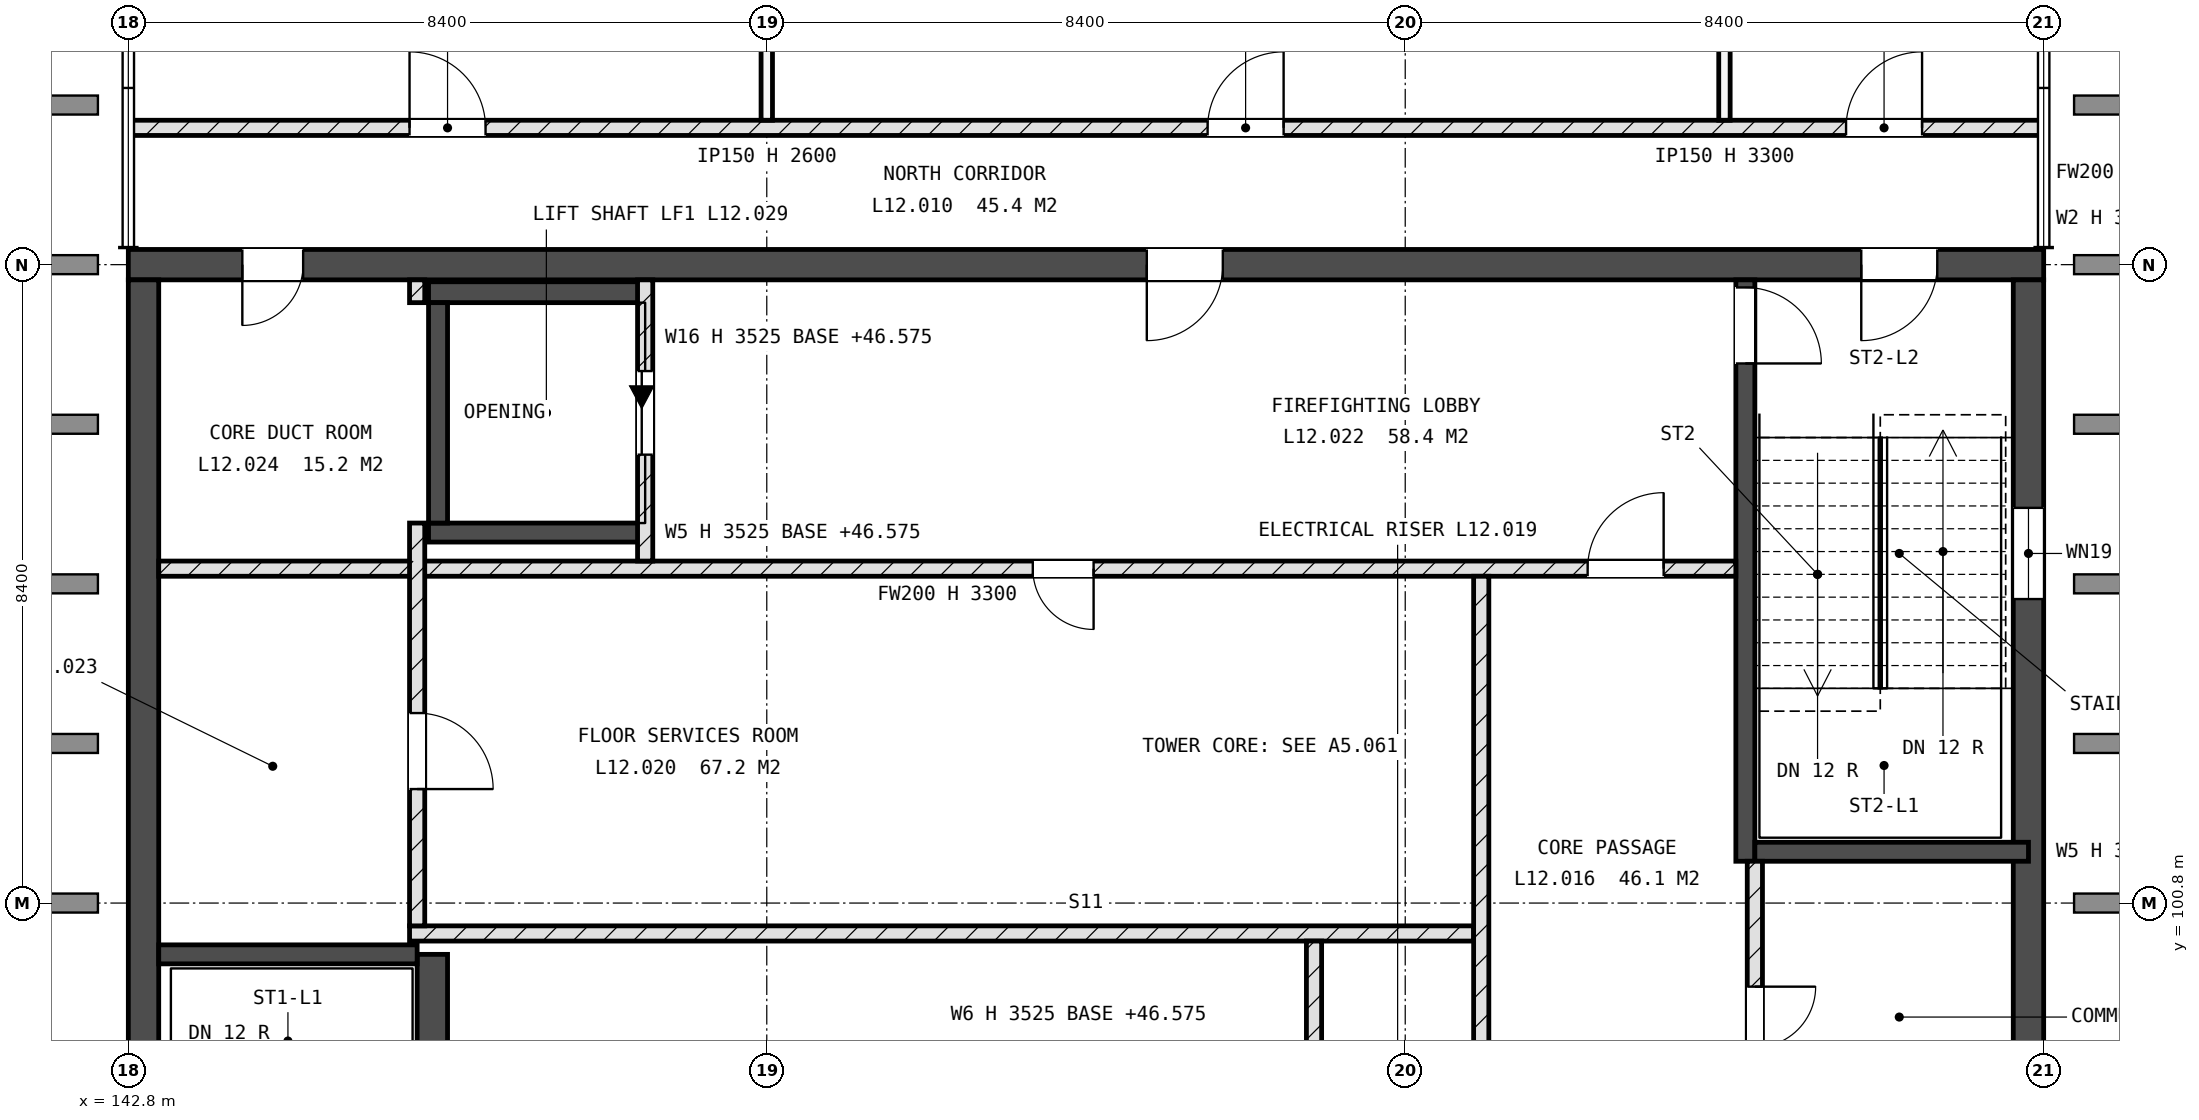
"""IFC4 building model, lengths in metres.
Left out: names, types, materials, properties, quantities, classifications, styles, units other than length and angle.
Written with IfcOpenShell. Run it as: python <this file> out.ifc"""

import sys

from ifc_helpers import new_model, si_unit, direction, frame, frame_2d, origin, place, context, subcontext, project, spatial, rectangle, extrude, element, fill, save


model = new_model("IFC4")
c1 = context("Model", 3, precision=1e-05, world=origin(), true_north=direction((0.0, 1.0)))
c2 = subcontext(c1, "Body", "Model", "MODEL_VIEW")
j1 = project(units=[si_unit("LENGTHUNIT", "METRE"), si_unit("PLANEANGLEUNIT", "RADIAN")], contexts=[c1])
p1 = place(None, origin())
s1 = spatial("IfcSite", under=j1, at=p1, CompositionType="ELEMENT")
p2 = place(p1, origin())
s2 = spatial("IfcBuilding", under=s1, at=p2, CompositionType="ELEMENT")
p3 = place(p2, frame((0.0, 0.0, 46.8)))
s3 = spatial("IfcBuildingStorey", under=s2, at=p3, CompositionType="ELEMENT", Elevation=46.8)
p4 = place(p3, frame((142.8, 109.2, -0.225), z_axis=(0.0, 0.0, 1.0), x_axis=(1.0, 0.0, 0.0)))
e1 = element("IfcWall", 1, at=p4, inside=s3, PredefinedType="SHEAR", context=c2, shape_type="SweptSolid", body=[
    extrude(rectangle(XDim=25.2, YDim=0.4, at=frame_2d((12.6, 0.0))), origin(), (0.0, 0.0, 1.0), 3.525),
])
p5 = place(p4, frame((22.8, 0.0, 0.225)))
e2 = element("IfcOpeningElement", 2, at=p5, cuts=e1, PredefinedType="OPENING", context=c2, shape_type="SweptSolid", body=[
    extrude(rectangle(XDim=1.0, YDim=2.1, at=frame_2d((0.5, 1.05))), frame((0.0, 0.21, 0.0), z_axis=(0.0, -1.0, 0.0), x_axis=(1.0, 0.0, 0.0)), (0.0, 0.0, 1.0), 0.42),
])
p6 = place(p4, frame((1.5, 0.0, 0.225)))
e3 = element("IfcOpeningElement", 3, at=p6, cuts=e1, PredefinedType="OPENING", context=c2, shape_type="SweptSolid", body=[
    extrude(rectangle(XDim=0.8, YDim=2.1, at=frame_2d((0.4, 1.05))), frame((0.0, 0.21, 0.0), z_axis=(0.0, -1.0, 0.0), x_axis=(1.0, 0.0, 0.0)), (0.0, 0.0, 1.0), 0.42),
])
p7 = place(p4, frame((13.4, 0.0, 0.225)))
e4 = element("IfcOpeningElement", 4, at=p7, cuts=e1, PredefinedType="OPENING", context=c2, shape_type="SweptSolid", body=[
    extrude(rectangle(XDim=1.0, YDim=2.1, at=frame_2d((0.5, 1.05))), frame((0.0, 0.21, 0.0), z_axis=(0.0, -1.0, 0.0), x_axis=(1.0, 0.0, 0.0)), (0.0, 0.0, 1.0), 0.42),
])
p8 = place(p3, frame((143.0, 92.6, -0.225), z_axis=(0.0, 0.0, 1.0), x_axis=(0.0, 1.0, 0.0)))
e5 = element("IfcWall", 5, at=p8, inside=s3, PredefinedType="SHEAR", context=c2, shape_type="SweptSolid", body=[
    extrude(rectangle(XDim=16.4, YDim=0.4, at=frame_2d((8.2, 0.0))), origin(), (0.0, 0.0, 1.0), 3.525),
])
p9 = place(p8, frame((3.0, 0.0, 1.825)))
e6 = element("IfcOpeningElement", 6, at=p9, cuts=e5, PredefinedType="OPENING", context=c2, shape_type="SweptSolid", body=[
    extrude(rectangle(XDim=1.2, YDim=0.9, at=frame_2d((0.6, 0.45))), frame((0.0, 0.21, 0.0), z_axis=(0.0, -1.0, 0.0), x_axis=(1.0, 0.0, 0.0)), (0.0, 0.0, 1.0), 0.42),
])
p10 = place(p3, frame((167.8, 92.6, -0.225), z_axis=(0.0, 0.0, 1.0), x_axis=(0.0, 1.0, 0.0)))
e7 = element("IfcWall", 7, at=p10, inside=s3, PredefinedType="SHEAR", context=c2, shape_type="SweptSolid", body=[
    extrude(rectangle(XDim=16.4, YDim=0.4, at=frame_2d((8.2, 0.0))), origin(), (0.0, 0.0, 1.0), 3.525),
])
p11 = place(p10, frame((12.2, 0.0, 1.825)))
e8 = element("IfcOpeningElement", 8, at=p11, cuts=e7, PredefinedType="OPENING", context=c2, shape_type="SweptSolid", body=[
    extrude(rectangle(XDim=1.2, YDim=0.9, at=frame_2d((0.6, 0.45))), frame((0.0, 0.21, 0.0), z_axis=(0.0, -1.0, 0.0), x_axis=(1.0, 0.0, 0.0)), (0.0, 0.0, 1.0), 0.42),
])
p12 = place(p3, frame((146.8, 92.6, -0.225), z_axis=(0.0, 0.0, 1.0), x_axis=(0.0, 1.0, 0.0)))
e9 = element("IfcWall", 9, at=p12, inside=s3, PredefinedType="SHEAR", context=c2, shape_type="SweptSolid", body=[
    extrude(rectangle(XDim=7.525, YDim=0.4, at=frame_2d((3.762, 0.0))), origin(), (0.0, 0.0, 1.0), 3.525),
])
p13 = place(p12, frame((0.1, 0.0, 0.225)))
e10 = element("IfcOpeningElement", 10, at=p13, cuts=e9, PredefinedType="OPENING", context=c2, shape_type="SweptSolid", body=[
    extrude(rectangle(XDim=1.0, YDim=2.1, at=frame_2d((0.5, 1.05))), frame((0.0, 0.21, 0.0), z_axis=(0.0, -1.0, 0.0), x_axis=(1.0, 0.0, 0.0)), (0.0, 0.0, 1.0), 0.42),
])
p14 = place(p3, frame((143.2, 100.125, -0.225), z_axis=(0.0, 0.0, 1.0), x_axis=(1.0, 0.0, 0.0)))
e11 = element("IfcWall", 11, at=p14, inside=s3, PredefinedType="SHEAR", context=c2, shape_type="SweptSolid", body=[
    extrude(rectangle(XDim=3.4, YDim=0.25, at=frame_2d((1.7, 0.0))), origin(), (0.0, 0.0, 1.0), 3.525),
])
p15 = place(p3, frame((164.075, 101.35, -0.225), z_axis=(0.0, 0.0, 1.0), x_axis=(0.0, 1.0, 0.0)))
e12 = element("IfcWall", 12, at=p15, inside=s3, PredefinedType="SHEAR", context=c2, shape_type="SweptSolid", body=[
    extrude(rectangle(XDim=7.65, YDim=0.25, at=frame_2d((3.825, 0.0))), origin(), (0.0, 0.0, 1.0), 3.525),
])
p16 = place(p15, frame((6.55, 0.0, 0.225)))
e13 = element("IfcOpeningElement", 13, at=p16, cuts=e12, PredefinedType="OPENING", context=c2, shape_type="SweptSolid", body=[
    extrude(rectangle(XDim=1.0, YDim=2.1, at=frame_2d((0.5, 1.05))), frame((0.0, 0.135, 0.0), z_axis=(0.0, -1.0, 0.0), x_axis=(1.0, 0.0, 0.0)), (0.0, 0.0, 1.0), 0.27),
])
p17 = place(p3, frame((164.2, 101.475, -0.225), z_axis=(0.0, 0.0, 1.0), x_axis=(1.0, 0.0, 0.0)))
e14 = element("IfcWall", 14, at=p17, inside=s3, PredefinedType="SHEAR", context=c2, shape_type="SweptSolid", body=[
    extrude(rectangle(XDim=3.6, YDim=0.25, at=frame_2d((1.8, 0.0))), origin(), (0.0, 0.0, 1.0), 3.525),
])
p18 = place(p3, frame((146.75, 105.675, -0.225), z_axis=(0.0, 0.0, 1.0), x_axis=(1.0, 0.0, 0.0)))
e15 = element("IfcWall", 15, at=p18, inside=s3, PredefinedType="SHEAR", context=c2, shape_type="SweptSolid", body=[
    extrude(rectangle(XDim=2.85, YDim=0.25, at=frame_2d((1.425, 0.0))), origin(), (0.0, 0.0, 1.0), 3.525),
])
p19 = place(p3, frame((146.75, 108.837, -0.225), z_axis=(0.0, 0.0, 1.0), x_axis=(1.0, 0.0, 0.0)))
e16 = element("IfcWall", 16, at=p19, inside=s3, PredefinedType="SHEAR", context=c2, shape_type="SweptSolid", body=[
    extrude(rectangle(XDim=2.85, YDim=0.275, at=frame_2d((1.425, 0.0))), origin(), (0.0, 0.0, 1.0), 3.525),
])
p20 = place(p3, frame((146.875, 105.8, -0.225), z_axis=(0.0, 0.0, 1.0), x_axis=(0.0, 1.0, 0.0)))
e17 = element("IfcWall", 17, at=p20, inside=s3, PredefinedType="SHEAR", context=c2, shape_type="SweptSolid", body=[
    extrude(rectangle(XDim=2.9, YDim=0.25, at=frame_2d((1.45, 0.0))), origin(), (0.0, 0.0, 1.0), 3.525),
])
p21 = place(p3, frame((146.5, 100.4, 0.0), z_axis=(0.0, 0.0, 1.0), x_axis=(1.0, 0.0, 0.0)))
e18 = element("IfcWall", 18, at=p21, inside=s3, PredefinedType="SOLIDWALL", context=c2, shape_type="SweptSolid", body=[
    extrude(rectangle(XDim=14.0, YDim=0.2, at=frame_2d((7.0, 0.0))), origin(), (0.0, 0.0, 1.0), 3.3),
])
p22 = place(p3, frame((143.2, 105.2, 0.0), z_axis=(0.0, 0.0, 1.0), x_axis=(1.0, 0.0, 0.0)))
e19 = element("IfcWall", 19, at=p22, inside=s3, PredefinedType="SOLIDWALL", context=c2, shape_type="SweptSolid", body=[
    extrude(rectangle(XDim=20.75, YDim=0.2, at=frame_2d((10.375, 0.0))), origin(), (0.0, 0.0, 1.0), 3.3),
])
p23 = place(p22, frame((11.5, 0.0, 0.0)))
e20 = element("IfcOpeningElement", 20, at=p23, cuts=e19, PredefinedType="OPENING", context=c2, shape_type="SweptSolid", body=[
    extrude(rectangle(XDim=0.8, YDim=2.1, at=frame_2d((0.4, 1.05))), frame((0.0, 0.11, 0.0), z_axis=(0.0, -1.0, 0.0), x_axis=(1.0, 0.0, 0.0)), (0.0, 0.0, 1.0), 0.22),
])
p24 = place(p22, frame((18.8, 0.0, 0.0)))
e21 = element("IfcOpeningElement", 21, at=p24, cuts=e19, PredefinedType="OPENING", context=c2, shape_type="SweptSolid", body=[
    extrude(rectangle(XDim=1.0, YDim=2.1, at=frame_2d((0.5, 1.05))), frame((0.0, 0.11, 0.0), z_axis=(0.0, -1.0, 0.0), x_axis=(1.0, 0.0, 0.0)), (0.0, 0.0, 1.0), 0.22),
])
p25 = place(p3, frame((142.8, 111.0, 0.0), z_axis=(0.0, 0.0, 1.0), x_axis=(1.0, 0.0, 0.0)))
e22 = element("IfcWall", 22, at=p25, inside=s3, PredefinedType="SOLIDWALL", context=c2, shape_type="SweptSolid", body=[
    extrude(rectangle(XDim=25.2, YDim=0.2, at=frame_2d((12.6, 0.0))), origin(), (0.0, 0.0, 1.0), 3.3),
])
p26 = place(p25, frame((3.7, 0.0, 0.0)))
e23 = element("IfcOpeningElement", 23, at=p26, cuts=e22, PredefinedType="OPENING", context=c2, shape_type="SweptSolid", body=[
    extrude(rectangle(XDim=1.0, YDim=2.1, at=frame_2d((0.5, 1.05))), frame((0.0, 0.11, 0.0), z_axis=(0.0, -1.0, 0.0), x_axis=(1.0, 0.0, 0.0)), (0.0, 0.0, 1.0), 0.22),
])
p27 = place(p25, frame((14.2, 0.0, 0.0)))
e24 = element("IfcOpeningElement", 24, at=p27, cuts=e22, PredefinedType="OPENING", context=c2, shape_type="SweptSolid", body=[
    extrude(rectangle(XDim=1.0, YDim=2.1, at=frame_2d((0.5, 1.05))), frame((0.0, 0.11, 0.0), z_axis=(0.0, -1.0, 0.0), x_axis=(1.0, 0.0, 0.0)), (0.0, 0.0, 1.0), 0.22),
])
p28 = place(p25, frame((22.6, 0.0, 0.0)))
e25 = element("IfcOpeningElement", 25, at=p28, cuts=e22, PredefinedType="OPENING", context=c2, shape_type="SweptSolid", body=[
    extrude(rectangle(XDim=1.0, YDim=2.1, at=frame_2d((0.5, 1.05))), frame((0.0, 0.11, 0.0), z_axis=(0.0, -1.0, 0.0), x_axis=(1.0, 0.0, 0.0)), (0.0, 0.0, 1.0), 0.22),
])
p29 = place(p3, frame((146.6, 100.5, 0.0), z_axis=(0.0, 0.0, 1.0), x_axis=(0.0, 1.0, 0.0)))
e26 = element("IfcWall", 26, at=p29, inside=s3, PredefinedType="SOLIDWALL", context=c2, shape_type="SweptSolid", body=[
    extrude(rectangle(XDim=5.3, YDim=0.2, at=frame_2d((2.65, 0.0))), origin(), (0.0, 0.0, 1.0), 3.3),
])
p30 = place(p29, frame((1.8, 0.0, 0.0)))
e27 = element("IfcOpeningElement", 27, at=p30, cuts=e26, PredefinedType="OPENING", context=c2, shape_type="SweptSolid", body=[
    extrude(rectangle(XDim=1.0, YDim=2.1, at=frame_2d((0.5, 1.05))), frame((0.0, 0.11, 0.0), z_axis=(0.0, -1.0, 0.0), x_axis=(1.0, 0.0, 0.0)), (0.0, 0.0, 1.0), 0.22),
])
p31 = place(p3, frame((146.6, 108.7, 0.0), z_axis=(0.0, 0.0, 1.0), x_axis=(0.0, 1.0, 0.0)))
e28 = element("IfcWall", 28, at=p31, inside=s3, PredefinedType="SOLIDWALL", context=c2, shape_type="SweptSolid", body=[
    extrude(rectangle(XDim=0.3, YDim=0.2, at=frame_2d((0.15, 0.0))), origin(), (0.0, 0.0, 1.0), 3.3),
])
p32 = place(p3, frame((149.6, 105.3, 0.0), z_axis=(0.0, 0.0, 1.0), x_axis=(0.0, 1.0, 0.0)))
e29 = element("IfcWall", 29, at=p32, inside=s3, PredefinedType="SOLIDWALL", context=c2, shape_type="SweptSolid", body=[
    extrude(rectangle(XDim=3.7, YDim=0.2, at=frame_2d((1.85, 0.0))), origin(), (0.0, 0.0, 1.0), 3.3),
])
p33 = place(p32, frame((1.4, 0.0, 0.0)))
e30 = element("IfcOpeningElement", 30, at=p33, cuts=e29, PredefinedType="OPENING", context=c2, shape_type="SweptSolid", body=[
    extrude(rectangle(XDim=1.1, YDim=2.1, at=frame_2d((0.55, 1.05))), frame((0.0, 0.11, 0.0), z_axis=(0.0, -1.0, 0.0), x_axis=(1.0, 0.0, 0.0)), (0.0, 0.0, 1.0), 0.22),
])
p34 = place(p3, frame((151.2, 111.1, 0.0), z_axis=(0.0, 0.0, 1.0), x_axis=(0.0, 1.0, 0.0)))
e31 = element("IfcWall", 31, at=p34, inside=s3, PredefinedType="PARTITIONING", context=c2, shape_type="SweptSolid", body=[
    extrude(rectangle(XDim=6.5, YDim=0.15, at=frame_2d((3.25, 0.0))), origin(), (0.0, 0.0, 1.0), 2.6),
])
p35 = place(p3, frame((158.4, 98.7, 0.0), z_axis=(0.0, 0.0, 1.0), x_axis=(0.0, 1.0, 0.0)))
e32 = element("IfcWall", 32, at=p35, inside=s3, PredefinedType="SOLIDWALL", context=c2, shape_type="SweptSolid", body=[
    extrude(rectangle(XDim=1.6, YDim=0.2, at=frame_2d((0.8, 0.0))), origin(), (0.0, 0.0, 1.0), 3.3),
])
p36 = place(p3, frame((160.6, 92.6, 0.0), z_axis=(0.0, 0.0, 1.0), x_axis=(0.0, 1.0, 0.0)))
e33 = element("IfcWall", 33, at=p36, inside=s3, PredefinedType="SOLIDWALL", context=c2, shape_type="SweptSolid", body=[
    extrude(rectangle(XDim=12.5, YDim=0.2, at=frame_2d((6.25, 0.0))), origin(), (0.0, 0.0, 1.0), 3.3),
])
p37 = place(p36, frame((5.1, 0.0, 0.0)))
e34 = element("IfcOpeningElement", 34, at=p37, cuts=e33, PredefinedType="OPENING", context=c2, shape_type="SweptSolid", body=[
    extrude(rectangle(XDim=0.8, YDim=2.1, at=frame_2d((0.4, 1.05))), frame((0.0, 0.11, 0.0), z_axis=(0.0, -1.0, 0.0), x_axis=(1.0, 0.0, 0.0)), (0.0, 0.0, 1.0), 0.22),
])
p38 = place(p36, frame((0.8, 0.0, 0.0)))
e35 = element("IfcOpeningElement", 35, at=p38, cuts=e33, PredefinedType="OPENING", context=c2, shape_type="SweptSolid", body=[
    extrude(rectangle(XDim=1.0, YDim=2.1, at=frame_2d((0.5, 1.05))), frame((0.0, 0.11, 0.0), z_axis=(0.0, -1.0, 0.0), x_axis=(1.0, 0.0, 0.0)), (0.0, 0.0, 1.0), 0.22),
])
p39 = place(p3, frame((163.8, 111.1, 0.0), z_axis=(0.0, 0.0, 1.0), x_axis=(0.0, 1.0, 0.0)))
e36 = element("IfcWall", 36, at=p39, inside=s3, PredefinedType="PARTITIONING", context=c2, shape_type="SweptSolid", body=[
    extrude(rectangle(XDim=6.5, YDim=0.15, at=frame_2d((3.25, 0.0))), origin(), (0.0, 0.0, 1.0), 3.3),
])
p40 = place(p3, frame((164.2, 92.6, 0.0), z_axis=(0.0, 0.0, 1.0), x_axis=(0.0, 1.0, 0.0)))
e37 = element("IfcWall", 37, at=p40, inside=s3, PredefinedType="SOLIDWALL", context=c2, shape_type="SweptSolid", body=[
    extrude(rectangle(XDim=8.75, YDim=0.2, at=frame_2d((4.375, 0.0))), origin(), (0.0, 0.0, 1.0), 3.3),
])
p41 = place(p40, frame((1.7, 0.0, 0.0)))
e38 = element("IfcOpeningElement", 38, at=p41, cuts=e37, PredefinedType="OPENING", context=c2, shape_type="SweptSolid", body=[
    extrude(rectangle(XDim=0.8, YDim=2.1, at=frame_2d((0.4, 1.05))), frame((0.0, 0.11, 0.0), z_axis=(0.0, -1.0, 0.0), x_axis=(1.0, 0.0, 0.0)), (0.0, 0.0, 1.0), 0.22),
])
p42 = place(p40, frame((6.3, 0.0, 0.0)))
e39 = element("IfcOpeningElement", 39, at=p42, cuts=e37, PredefinedType="OPENING", context=c2, shape_type="SweptSolid", body=[
    extrude(rectangle(XDim=0.8, YDim=2.1, at=frame_2d((0.4, 1.05))), frame((0.0, 0.11, 0.0), z_axis=(0.0, -1.0, 0.0), x_axis=(1.0, 0.0, 0.0)), (0.0, 0.0, 1.0), 0.22),
])
p43 = place(p11, origin())
e40 = element("IfcWindow", 40, at=p43, inside=s3, PartitioningType="SINGLE_PANEL", PredefinedType="WINDOW", context=c2, shape_type="SweptSolid", body=[
    extrude(rectangle(XDim=1.2, YDim=0.9, at=frame_2d((0.6, 0.45))), frame((0.0, 0.03, 0.0), z_axis=(0.0, -1.0, 0.0), x_axis=(1.0, 0.0, 0.0)), (0.0, 0.0, 1.0), 0.06),
])
fill(e8, e40)
p44 = place(p33, origin())
e41 = element("IfcDoor", 41, at=p44, inside=s3, OperationType="SLIDING_TO_LEFT", PredefinedType="DOOR", context=c2, shape_type="SweptSolid", body=[
    extrude(rectangle(XDim=1.1, YDim=2.1, at=frame_2d((0.55, 1.05))), frame((0.0, 0.025, 0.0), z_axis=(0.0, -1.0, 0.0), x_axis=(1.0, 0.0, 0.0)), (0.0, 0.0, 1.0), 0.05),
])
fill(e30, e41)
p45 = place(p16, origin())
e42 = element("IfcDoor", 42, at=p45, inside=s3, OperationType="SINGLE_SWING_LEFT", PredefinedType="DOOR", context=c2, shape_type="SweptSolid", body=[
    extrude(rectangle(XDim=1.0, YDim=2.1, at=frame_2d((0.5, 1.05))), frame((0.0, 0.025, 0.0), z_axis=(0.0, -1.0, 0.0), x_axis=(1.0, 0.0, 0.0)), (0.0, 0.0, 1.0), 0.05),
])
fill(e13, e42)
p46 = place(p5, origin())
e43 = element("IfcDoor", 43, at=p46, inside=s3, OperationType="SINGLE_SWING_LEFT", PredefinedType="DOOR", context=c2, shape_type="SweptSolid", body=[
    extrude(rectangle(XDim=1.0, YDim=2.1, at=frame_2d((0.5, 1.05))), frame((0.0, 0.025, 0.0), z_axis=(0.0, -1.0, 0.0), x_axis=(1.0, 0.0, 0.0)), (0.0, 0.0, 1.0), 0.05),
])
fill(e2, e43)
p47 = place(p26, origin())
e44 = element("IfcDoor", 44, at=p47, inside=s3, OperationType="SINGLE_SWING_RIGHT", PredefinedType="DOOR", context=c2, shape_type="SweptSolid", body=[
    extrude(rectangle(XDim=1.0, YDim=2.1, at=frame_2d((0.5, 1.05))), frame((0.0, 0.025, 0.0), z_axis=(0.0, -1.0, 0.0), x_axis=(1.0, 0.0, 0.0)), (0.0, 0.0, 1.0), 0.05),
])
fill(e23, e44)
p48 = place(p27, origin())
e45 = element("IfcDoor", 45, at=p48, inside=s3, OperationType="SINGLE_SWING_LEFT", PredefinedType="DOOR", context=c2, shape_type="SweptSolid", body=[
    extrude(rectangle(XDim=1.0, YDim=2.1, at=frame_2d((0.5, 1.05))), frame((0.0, 0.025, 0.0), z_axis=(0.0, -1.0, 0.0), x_axis=(1.0, 0.0, 0.0)), (0.0, 0.0, 1.0), 0.05),
])
fill(e24, e45)
p49 = place(p28, origin())
e46 = element("IfcDoor", 46, at=p49, inside=s3, OperationType="SINGLE_SWING_LEFT", PredefinedType="DOOR", context=c2, shape_type="SweptSolid", body=[
    extrude(rectangle(XDim=1.0, YDim=2.1, at=frame_2d((0.5, 1.05))), frame((0.0, 0.025, 0.0), z_axis=(0.0, -1.0, 0.0), x_axis=(1.0, 0.0, 0.0)), (0.0, 0.0, 1.0), 0.05),
])
fill(e25, e46)
p50 = place(p42, origin())
e47 = element("IfcDoor", 47, at=p50, inside=s3, OperationType="SINGLE_SWING_RIGHT", PredefinedType="DOOR", context=c2, shape_type="SweptSolid", body=[
    extrude(rectangle(XDim=0.8, YDim=2.1, at=frame_2d((0.4, 1.05))), frame((0.0, 0.025, 0.0), z_axis=(0.0, -1.0, 0.0), x_axis=(1.0, 0.0, 0.0)), (0.0, 0.0, 1.0), 0.05),
])
fill(e39, e47)
p51 = place(p23, origin())
e48 = element("IfcDoor", 48, at=p51, inside=s3, OperationType="SINGLE_SWING_RIGHT", PredefinedType="DOOR", context=c2, shape_type="SweptSolid", body=[
    extrude(rectangle(XDim=0.8, YDim=2.1, at=frame_2d((0.4, 1.05))), frame((0.0, 0.025, 0.0), z_axis=(0.0, -1.0, 0.0), x_axis=(1.0, 0.0, 0.0)), (0.0, 0.0, 1.0), 0.05),
])
fill(e20, e48)
p52 = place(p30, origin())
e49 = element("IfcDoor", 49, at=p52, inside=s3, OperationType="SINGLE_SWING_LEFT", PredefinedType="DOOR", context=c2, shape_type="SweptSolid", body=[
    extrude(rectangle(XDim=1.0, YDim=2.1, at=frame_2d((0.5, 1.05))), frame((0.0, 0.025, 0.0), z_axis=(0.0, -1.0, 0.0), x_axis=(1.0, 0.0, 0.0)), (0.0, 0.0, 1.0), 0.05),
])
fill(e27, e49)
p53 = place(p6, origin())
e50 = element("IfcDoor", 50, at=p53, inside=s3, OperationType="SINGLE_SWING_LEFT", PredefinedType="DOOR", context=c2, shape_type="SweptSolid", body=[
    extrude(rectangle(XDim=0.8, YDim=2.1, at=frame_2d((0.4, 1.05))), frame((0.0, 0.025, 0.0), z_axis=(0.0, -1.0, 0.0), x_axis=(1.0, 0.0, 0.0)), (0.0, 0.0, 1.0), 0.05),
])
fill(e3, e50)
p54 = place(p7, origin())
e51 = element("IfcDoor", 51, at=p54, inside=s3, OperationType="SINGLE_SWING_LEFT", PredefinedType="DOOR", context=c2, shape_type="SweptSolid", body=[
    extrude(rectangle(XDim=1.0, YDim=2.1, at=frame_2d((0.5, 1.05))), frame((0.0, 0.025, 0.0), z_axis=(0.0, -1.0, 0.0), x_axis=(1.0, 0.0, 0.0)), (0.0, 0.0, 1.0), 0.05),
])
fill(e4, e51)
p55 = place(p24, origin())
e52 = element("IfcDoor", 52, at=p55, inside=s3, OperationType="SINGLE_SWING_LEFT", PredefinedType="DOOR", context=c2, shape_type="SweptSolid", body=[
    extrude(rectangle(XDim=1.0, YDim=2.1, at=frame_2d((0.5, 1.05))), frame((0.0, 0.025, 0.0), z_axis=(0.0, -1.0, 0.0), x_axis=(1.0, 0.0, 0.0)), (0.0, 0.0, 1.0), 0.05),
])
fill(e21, e52)
save(model, sys.argv[1])
